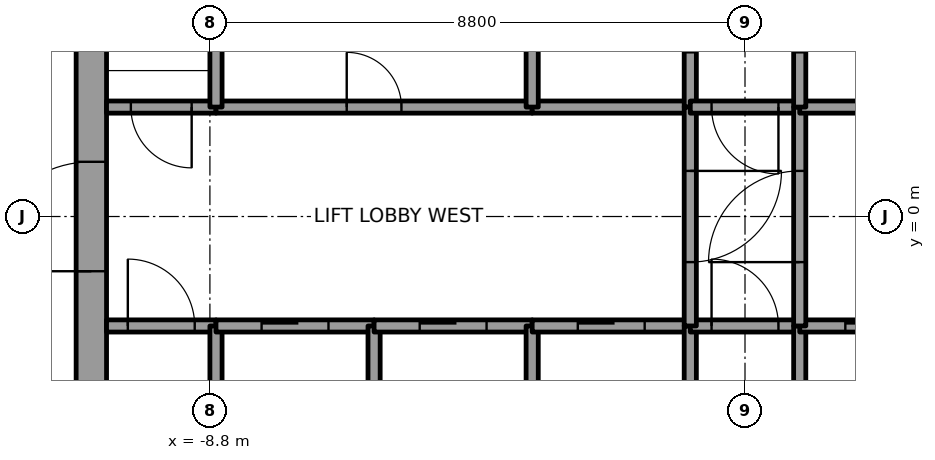
"""IFC4 building model, lengths in metres.
Left out: names, types, materials, properties, quantities, classifications, styles, units other than length and angle.
Written with IfcOpenShell. Run it as: python <this file> out.ifc"""

import sys

from ifc_helpers import new_model, si_unit, direction, frame, frame_2d, origin, place, context, subcontext, project, spatial, rectangle, extrude, element, fill, save


model = new_model("IFC4")
c1 = context("Model", 3, precision=1e-05, world=origin(), true_north=direction((0.0, 1.0)))
c2 = subcontext(c1, "Body", "Model", "MODEL_VIEW")
j1 = project(units=[si_unit("LENGTHUNIT", "METRE"), si_unit("PLANEANGLEUNIT", "RADIAN")], contexts=[c1])
p1 = place(None, origin())
s1 = spatial("IfcSite", under=j1, at=p1, CompositionType="ELEMENT")
p2 = place(p1, origin())
s2 = spatial("IfcBuilding", under=s1, at=p2, CompositionType="ELEMENT")
p3 = place(p2, frame((0.0, 0.0, 255.0)))
s3 = spatial("IfcBuildingStorey", under=s2, at=p3, CompositionType="ELEMENT", Elevation=255.0)
p4 = place(p3, frame((-10.75, -7.5, 0.0), z_axis=(0.0, 0.0, 1.0), x_axis=(0.0, 1.0, 0.0)))
e1 = element("IfcWall", 1, at=p4, inside=s3, PredefinedType="SHEAR", context=c2, shape_type="SweptSolid", body=[
    extrude(rectangle(XDim=15.0, YDim=0.5, at=frame_2d((7.5, 0.0))), origin(), (0.0, 0.0, 1.0), 4.0),
])
p5 = place(p4, frame((6.6, 0.0, 0.0)))
e2 = element("IfcOpeningElement", 2, at=p5, cuts=e1, PredefinedType="OPENING", context=c2, shape_type="SweptSolid", body=[
    extrude(rectangle(XDim=1.8, YDim=2.1, at=frame_2d((0.9, 1.05))), frame((0.0, 0.25, 0.0), z_axis=(0.0, -1.0, 0.0), x_axis=(1.0, 0.0, 0.0)), (0.0, 0.0, 1.0), 0.5),
])
p6 = place(p3, frame((-10.5, -1.8, 0.0), z_axis=(0.0, 0.0, 1.0), x_axis=(1.0, 0.0, 0.0)))
e3 = element("IfcWall", 3, at=p6, inside=s3, PredefinedType="SOLIDWALL", context=c2, shape_type="SweptSolid", body=[
    extrude(rectangle(XDim=1.8, YDim=0.2, at=frame_2d((0.9, 0.0))), origin(), (0.0, 0.0, 1.0), 3.85),
])
p7 = place(p6, frame((0.35, 0.0, 0.0)))
e4 = element("IfcOpeningElement", 4, at=p7, cuts=e3, PredefinedType="OPENING", context=c2, shape_type="SweptSolid", body=[
    extrude(rectangle(XDim=1.1, YDim=2.1, at=frame_2d((0.55, 1.05))), frame((0.0, 0.1, 0.0), z_axis=(0.0, -1.0, 0.0), x_axis=(1.0, 0.0, 0.0)), (0.0, 0.0, 1.0), 0.2),
])
p8 = place(p3, frame((-8.7, 1.8, 0.0), z_axis=(0.0, 0.0, 1.0), x_axis=(-1.0, 0.0, 0.0)))
e5 = element("IfcWall", 5, at=p8, inside=s3, PredefinedType="SOLIDWALL", context=c2, shape_type="SweptSolid", body=[
    extrude(rectangle(XDim=1.8, YDim=0.2, at=frame_2d((0.9, 0.0))), origin(), (0.0, 0.0, 1.0), 3.85),
])
p9 = place(p8, frame((0.4, 0.0, 0.0)))
e6 = element("IfcOpeningElement", 6, at=p9, cuts=e5, PredefinedType="OPENING", context=c2, shape_type="SweptSolid", body=[
    extrude(rectangle(XDim=1.0, YDim=2.1, at=frame_2d((0.5, 1.05))), frame((0.0, 0.1, 0.0), z_axis=(0.0, -1.0, 0.0), x_axis=(1.0, 0.0, 0.0)), (0.0, 0.0, 1.0), 0.2),
])
p10 = place(p3, frame((-8.7, -4.6, 0.0), z_axis=(0.0, 0.0, 1.0), x_axis=(0.0, 1.0, 0.0)))
e7 = element("IfcWall", 7, at=p10, inside=s3, PredefinedType="SOLIDWALL", context=c2, shape_type="SweptSolid", body=[
    extrude(rectangle(XDim=2.8, YDim=0.2, at=frame_2d((1.4, 0.0))), origin(), (0.0, 0.0, 1.0), 3.85),
])
p11 = place(p3, frame((-8.7, -1.8, 0.0), z_axis=(0.0, 0.0, 1.0), x_axis=(1.0, 0.0, 0.0)))
e8 = element("IfcWall", 8, at=p11, inside=s3, PredefinedType="SOLIDWALL", context=c2, shape_type="SweptSolid", body=[
    extrude(rectangle(XDim=2.6, YDim=0.2, at=frame_2d((1.3, 0.0))), origin(), (0.0, 0.0, 1.0), 3.85),
])
p12 = place(p11, frame((0.75, 0.0, 0.0)))
e9 = element("IfcOpeningElement", 9, at=p12, cuts=e8, PredefinedType="OPENING", context=c2, shape_type="SweptSolid", body=[
    extrude(rectangle(XDim=1.1, YDim=2.1, at=frame_2d((0.55, 1.05))), frame((0.0, 0.1, 0.0), z_axis=(0.0, -1.0, 0.0), x_axis=(1.0, 0.0, 0.0)), (0.0, 0.0, 1.0), 0.2),
])
p13 = place(p3, frame((-8.7, 1.8, 0.0), z_axis=(0.0, 0.0, 1.0), x_axis=(1.0, 0.0, 0.0)))
e10 = element("IfcWall", 10, at=p13, inside=s3, PredefinedType="SOLIDWALL", context=c2, shape_type="SweptSolid", body=[
    extrude(rectangle(XDim=5.2, YDim=0.2, at=frame_2d((2.6, 0.0))), origin(), (0.0, 0.0, 1.0), 3.85),
])
p14 = place(p13, frame((2.15, 0.0, 0.0)))
e11 = element("IfcOpeningElement", 11, at=p14, cuts=e10, PredefinedType="OPENING", context=c2, shape_type="SweptSolid", body=[
    extrude(rectangle(XDim=0.9, YDim=2.1, at=frame_2d((0.45, 1.05))), frame((0.0, 0.1, 0.0), z_axis=(0.0, -1.0, 0.0), x_axis=(1.0, 0.0, 0.0)), (0.0, 0.0, 1.0), 0.2),
])
for number, where, z_axis, x_axis in (
    (12, (-8.7, 4.6, 0.0), (0.0, 0.0, 1.0), (0.0, -1.0, 0.0)),
    (13, (-6.1, -4.6, 0.0), (0.0, 0.0, 1.0), (0.0, 1.0, 0.0)),
):
    element("IfcWall", number, at=place(p3, frame(where, z_axis=z_axis, x_axis=x_axis)), inside=s3, PredefinedType="SOLIDWALL", context=c2, shape_type="SweptSolid", body=[
        extrude(rectangle(XDim=2.8, YDim=0.2, at=frame_2d((1.4, 0.0))), origin(), (0.0, 0.0, 1.0), 3.85),
    ])
p15 = place(p3, frame((-6.1, -1.8, 0.0), z_axis=(0.0, 0.0, 1.0), x_axis=(1.0, 0.0, 0.0)))
e14 = element("IfcWall", 14, at=p15, inside=s3, PredefinedType="SOLIDWALL", context=c2, shape_type="SweptSolid", body=[
    extrude(rectangle(XDim=2.6, YDim=0.2, at=frame_2d((1.3, 0.0))), origin(), (0.0, 0.0, 1.0), 3.85),
])
p16 = place(p15, frame((0.75, 0.0, 0.0)))
e15 = element("IfcOpeningElement", 15, at=p16, cuts=e14, PredefinedType="OPENING", context=c2, shape_type="SweptSolid", body=[
    extrude(rectangle(XDim=1.1, YDim=2.1, at=frame_2d((0.55, 1.05))), frame((0.0, 0.1, 0.0), z_axis=(0.0, -1.0, 0.0), x_axis=(1.0, 0.0, 0.0)), (0.0, 0.0, 1.0), 0.2),
])
p17 = place(p3, frame((-3.5, -4.6, 0.0), z_axis=(0.0, 0.0, 1.0), x_axis=(0.0, 1.0, 0.0)))
e16 = element("IfcWall", 16, at=p17, inside=s3, PredefinedType="SOLIDWALL", context=c2, shape_type="SweptSolid", body=[
    extrude(rectangle(XDim=2.8, YDim=0.2, at=frame_2d((1.4, 0.0))), origin(), (0.0, 0.0, 1.0), 3.85),
])
p18 = place(p3, frame((-3.5, -1.8, 0.0), z_axis=(0.0, 0.0, 1.0), x_axis=(1.0, 0.0, 0.0)))
e17 = element("IfcWall", 17, at=p18, inside=s3, PredefinedType="SOLIDWALL", context=c2, shape_type="SweptSolid", body=[
    extrude(rectangle(XDim=2.6, YDim=0.2, at=frame_2d((1.3, 0.0))), origin(), (0.0, 0.0, 1.0), 3.85),
])
p19 = place(p18, frame((0.75, 0.0, 0.0)))
e18 = element("IfcOpeningElement", 18, at=p19, cuts=e17, PredefinedType="OPENING", context=c2, shape_type="SweptSolid", body=[
    extrude(rectangle(XDim=1.1, YDim=2.1, at=frame_2d((0.55, 1.05))), frame((0.0, 0.1, 0.0), z_axis=(0.0, -1.0, 0.0), x_axis=(1.0, 0.0, 0.0)), (0.0, 0.0, 1.0), 0.2),
])
p20 = place(p3, frame((-0.9, 1.8, 0.0), z_axis=(0.0, 0.0, 1.0), x_axis=(-1.0, 0.0, 0.0)))
e19 = element("IfcWall", 19, at=p20, inside=s3, PredefinedType="SOLIDWALL", context=c2, shape_type="SweptSolid", body=[
    extrude(rectangle(XDim=2.6, YDim=0.2, at=frame_2d((1.3, 0.0))), origin(), (0.0, 0.0, 1.0), 3.85),
])
p21 = place(p3, frame((-3.5, 1.8, 0.0), z_axis=(0.0, 0.0, 1.0), x_axis=(0.0, 1.0, 0.0)))
e20 = element("IfcWall", 20, at=p21, inside=s3, PredefinedType="SOLIDWALL", context=c2, shape_type="SweptSolid", body=[
    extrude(rectangle(XDim=2.8, YDim=0.2, at=frame_2d((1.4, 0.0))), origin(), (0.0, 0.0, 1.0), 3.85),
])
p22 = place(p3, frame((-0.9, 1.8, 0.0), z_axis=(0.0, 0.0, 1.0), x_axis=(0.0, 1.0, 0.0)))
e21 = element("IfcWall", 21, at=p22, inside=s3, PredefinedType="SOLIDWALL", context=c2, shape_type="SweptSolid", body=[
    extrude(rectangle(XDim=3.0, YDim=0.2, at=frame_2d((1.5, 0.0))), origin(), (0.0, 0.0, 1.0), 3.85),
])
p23 = place(p22, frame((0.9, 0.0, 0.0)))
e22 = element("IfcOpeningElement", 22, at=p23, cuts=e21, PredefinedType="OPENING", context=c2, shape_type="SweptSolid", body=[
    extrude(rectangle(XDim=1.2, YDim=2.1, at=frame_2d((0.6, 1.05))), frame((0.0, 0.1, 0.0), z_axis=(0.0, -1.0, 0.0), x_axis=(1.0, 0.0, 0.0)), (0.0, 0.0, 1.0), 0.2),
])
p24 = place(p3, frame((-0.9, -4.6, 0.0), z_axis=(0.0, 0.0, 1.0), x_axis=(0.0, 1.0, 0.0)))
e23 = element("IfcWall", 23, at=p24, inside=s3, PredefinedType="SOLIDWALL", context=c2, shape_type="SweptSolid", body=[
    extrude(rectangle(XDim=2.8, YDim=0.2, at=frame_2d((1.4, 0.0))), origin(), (0.0, 0.0, 1.0), 3.85),
])
p25 = place(p3, frame((-0.9, -1.8, 0.0), z_axis=(0.0, 0.0, 1.0), x_axis=(1.0, 0.0, 0.0)))
e24 = element("IfcWall", 24, at=p25, inside=s3, PredefinedType="SOLIDWALL", context=c2, shape_type="SweptSolid", body=[
    extrude(rectangle(XDim=1.8, YDim=0.2, at=frame_2d((0.9, 0.0))), origin(), (0.0, 0.0, 1.0), 3.85),
])
p26 = place(p25, frame((0.35, 0.0, 0.0)))
e25 = element("IfcOpeningElement", 25, at=p26, cuts=e24, PredefinedType="OPENING", context=c2, shape_type="SweptSolid", body=[
    extrude(rectangle(XDim=1.1, YDim=2.1, at=frame_2d((0.55, 1.05))), frame((0.0, 0.1, 0.0), z_axis=(0.0, -1.0, 0.0), x_axis=(1.0, 0.0, 0.0)), (0.0, 0.0, 1.0), 0.2),
])
p27 = place(p3, frame((-0.9, 1.8, 0.0), z_axis=(0.0, 0.0, 1.0), x_axis=(0.0, -1.0, 0.0)))
e26 = element("IfcWall", 26, at=p27, inside=s3, PredefinedType="SOLIDWALL", context=c2, shape_type="SweptSolid", body=[
    extrude(rectangle(XDim=3.6, YDim=0.2, at=frame_2d((1.8, 0.0))), origin(), (0.0, 0.0, 1.0), 3.85),
])
p28 = place(p27, frame((1.05, 0.0, 0.0)))
e27 = element("IfcOpeningElement", 27, at=p28, cuts=e26, PredefinedType="OPENING", context=c2, shape_type="SweptSolid", body=[
    extrude(rectangle(XDim=1.5, YDim=2.1, at=frame_2d((0.75, 1.05))), frame((0.0, 0.1, 0.0), z_axis=(0.0, -1.0, 0.0), x_axis=(1.0, 0.0, 0.0)), (0.0, 0.0, 1.0), 0.2),
])
p29 = place(p3, frame((0.9, 1.8, 0.0), z_axis=(0.0, 0.0, 1.0), x_axis=(-1.0, 0.0, 0.0)))
e28 = element("IfcWall", 28, at=p29, inside=s3, PredefinedType="SOLIDWALL", context=c2, shape_type="SweptSolid", body=[
    extrude(rectangle(XDim=1.8, YDim=0.2, at=frame_2d((0.9, 0.0))), origin(), (0.0, 0.0, 1.0), 3.85),
])
p30 = place(p29, frame((0.35, 0.0, 0.0)))
e29 = element("IfcOpeningElement", 29, at=p30, cuts=e28, PredefinedType="OPENING", context=c2, shape_type="SweptSolid", body=[
    extrude(rectangle(XDim=1.1, YDim=2.1, at=frame_2d((0.55, 1.05))), frame((0.0, 0.1, 0.0), z_axis=(0.0, -1.0, 0.0), x_axis=(1.0, 0.0, 0.0)), (0.0, 0.0, 1.0), 0.2),
])
p31 = place(p3, frame((0.9, -1.8, 0.0), z_axis=(0.0, 0.0, 1.0), x_axis=(0.0, -1.0, 0.0)))
e30 = element("IfcWall", 30, at=p31, inside=s3, PredefinedType="SOLIDWALL", context=c2, shape_type="SweptSolid", body=[
    extrude(rectangle(XDim=2.8, YDim=0.2, at=frame_2d((1.4, 0.0))), origin(), (0.0, 0.0, 1.0), 3.85),
])
p32 = place(p3, frame((0.9, -1.8, 0.0), z_axis=(0.0, 0.0, 1.0), x_axis=(1.0, 0.0, 0.0)))
e31 = element("IfcWall", 31, at=p32, inside=s3, PredefinedType="SOLIDWALL", context=c2, shape_type="SweptSolid", body=[
    extrude(rectangle(XDim=2.6, YDim=0.2, at=frame_2d((1.3, 0.0))), origin(), (0.0, 0.0, 1.0), 3.85),
])
p33 = place(p32, frame((0.75, 0.0, 0.0)))
e32 = element("IfcOpeningElement", 32, at=p33, cuts=e31, PredefinedType="OPENING", context=c2, shape_type="SweptSolid", body=[
    extrude(rectangle(XDim=1.1, YDim=2.1, at=frame_2d((0.55, 1.05))), frame((0.0, 0.1, 0.0), z_axis=(0.0, -1.0, 0.0), x_axis=(1.0, 0.0, 0.0)), (0.0, 0.0, 1.0), 0.2),
])
p34 = place(p3, frame((0.9, -1.8, 0.0), z_axis=(0.0, 0.0, 1.0), x_axis=(0.0, 1.0, 0.0)))
e33 = element("IfcWall", 33, at=p34, inside=s3, PredefinedType="SOLIDWALL", context=c2, shape_type="SweptSolid", body=[
    extrude(rectangle(XDim=3.6, YDim=0.2, at=frame_2d((1.8, 0.0))), origin(), (0.0, 0.0, 1.0), 3.85),
])
p35 = place(p34, frame((1.05, 0.0, 0.0)))
e34 = element("IfcOpeningElement", 34, at=p35, cuts=e33, PredefinedType="OPENING", context=c2, shape_type="SweptSolid", body=[
    extrude(rectangle(XDim=1.5, YDim=2.1, at=frame_2d((0.75, 1.05))), frame((0.0, 0.1, 0.0), z_axis=(0.0, -1.0, 0.0), x_axis=(1.0, 0.0, 0.0)), (0.0, 0.0, 1.0), 0.2),
])
p36 = place(p3, frame((3.5, 1.8, 0.0), z_axis=(0.0, 0.0, 1.0), x_axis=(-1.0, 0.0, 0.0)))
e35 = element("IfcWall", 35, at=p36, inside=s3, PredefinedType="SOLIDWALL", context=c2, shape_type="SweptSolid", body=[
    extrude(rectangle(XDim=2.6, YDim=0.2, at=frame_2d((1.3, 0.0))), origin(), (0.0, 0.0, 1.0), 3.85),
])
p37 = place(p3, frame((0.9, 4.8, 0.0), z_axis=(0.0, 0.0, 1.0), x_axis=(0.0, -1.0, 0.0)))
e36 = element("IfcWall", 36, at=p37, inside=s3, PredefinedType="SOLIDWALL", context=c2, shape_type="SweptSolid", body=[
    extrude(rectangle(XDim=3.0, YDim=0.2, at=frame_2d((1.5, 0.0))), origin(), (0.0, 0.0, 1.0), 3.85),
])
p38 = place(p37, frame((0.9, 0.0, 0.0)))
e37 = element("IfcOpeningElement", 37, at=p38, cuts=e36, PredefinedType="OPENING", context=c2, shape_type="SweptSolid", body=[
    extrude(rectangle(XDim=1.2, YDim=2.1, at=frame_2d((0.6, 1.05))), frame((0.0, 0.1, 0.0), z_axis=(0.0, -1.0, 0.0), x_axis=(1.0, 0.0, 0.0)), (0.0, 0.0, 1.0), 0.2),
])
p39 = place(p12, origin())
e38 = element("IfcDoor", 38, at=p39, inside=s3, OperationType="SLIDING_TO_RIGHT", PredefinedType="DOOR", context=c2, shape_type="SweptSolid", body=[
    extrude(rectangle(XDim=1.1, YDim=2.1, at=frame_2d((0.55, 1.05))), frame((0.0, 0.025, 0.0), z_axis=(0.0, -1.0, 0.0), x_axis=(1.0, 0.0, 0.0)), (0.0, 0.0, 1.0), 0.05),
])
fill(e9, e38)
p40 = place(p16, origin())
e39 = element("IfcDoor", 39, at=p40, inside=s3, OperationType="SLIDING_TO_LEFT", PredefinedType="DOOR", context=c2, shape_type="SweptSolid", body=[
    extrude(rectangle(XDim=1.1, YDim=2.1, at=frame_2d((0.55, 1.05))), frame((0.0, 0.025, 0.0), z_axis=(0.0, -1.0, 0.0), x_axis=(1.0, 0.0, 0.0)), (0.0, 0.0, 1.0), 0.05),
])
fill(e15, e39)
p41 = place(p19, origin())
e40 = element("IfcDoor", 40, at=p41, inside=s3, OperationType="SLIDING_TO_RIGHT", PredefinedType="DOOR", context=c2, shape_type="SweptSolid", body=[
    extrude(rectangle(XDim=1.1, YDim=2.1, at=frame_2d((0.55, 1.05))), frame((0.0, 0.025, 0.0), z_axis=(0.0, -1.0, 0.0), x_axis=(1.0, 0.0, 0.0)), (0.0, 0.0, 1.0), 0.05),
])
fill(e18, e40)
p42 = place(p33, origin())
e41 = element("IfcDoor", 41, at=p42, inside=s3, OperationType="SLIDING_TO_RIGHT", PredefinedType="DOOR", context=c2, shape_type="SweptSolid", body=[
    extrude(rectangle(XDim=1.1, YDim=2.1, at=frame_2d((0.55, 1.05))), frame((0.0, 0.025, 0.0), z_axis=(0.0, -1.0, 0.0), x_axis=(1.0, 0.0, 0.0)), (0.0, 0.0, 1.0), 0.05),
])
fill(e32, e41)
p43 = place(p28, origin())
e42 = element("IfcDoor", 42, at=p43, inside=s3, OperationType="DOUBLE_DOOR_SINGLE_SWING", PredefinedType="DOOR", context=c2, shape_type="SweptSolid", body=[
    extrude(rectangle(XDim=1.5, YDim=2.1, at=frame_2d((0.75, 1.05))), frame((0.0, 0.025, 0.0), z_axis=(0.0, -1.0, 0.0), x_axis=(1.0, 0.0, 0.0)), (0.0, 0.0, 1.0), 0.05),
])
fill(e27, e42)
p44 = place(p35, origin())
e43 = element("IfcDoor", 43, at=p44, inside=s3, OperationType="DOUBLE_DOOR_SINGLE_SWING", PredefinedType="DOOR", context=c2, shape_type="SweptSolid", body=[
    extrude(rectangle(XDim=1.5, YDim=2.1, at=frame_2d((0.75, 1.05))), frame((0.0, 0.025, 0.0), z_axis=(0.0, -1.0, 0.0), x_axis=(1.0, 0.0, 0.0)), (0.0, 0.0, 1.0), 0.05),
])
fill(e34, e43)
p45 = place(p7, origin())
e44 = element("IfcDoor", 44, at=p45, inside=s3, OperationType="SINGLE_SWING_LEFT", PredefinedType="DOOR", context=c2, shape_type="SweptSolid", body=[
    extrude(rectangle(XDim=1.1, YDim=2.1, at=frame_2d((0.55, 1.05))), frame((0.0, 0.025, 0.0), z_axis=(0.0, -1.0, 0.0), x_axis=(1.0, 0.0, 0.0)), (0.0, 0.0, 1.0), 0.05),
])
fill(e4, e44)
p46 = place(p30, origin())
e45 = element("IfcDoor", 45, at=p46, inside=s3, OperationType="SINGLE_SWING_LEFT", PredefinedType="DOOR", context=c2, shape_type="SweptSolid", body=[
    extrude(rectangle(XDim=1.1, YDim=2.1, at=frame_2d((0.55, 1.05))), frame((0.0, 0.025, 0.0), z_axis=(0.0, -1.0, 0.0), x_axis=(1.0, 0.0, 0.0)), (0.0, 0.0, 1.0), 0.05),
])
fill(e29, e45)
p47 = place(p26, origin())
e46 = element("IfcDoor", 46, at=p47, inside=s3, OperationType="SINGLE_SWING_LEFT", PredefinedType="DOOR", context=c2, shape_type="SweptSolid", body=[
    extrude(rectangle(XDim=1.1, YDim=2.1, at=frame_2d((0.55, 1.05))), frame((0.0, 0.025, 0.0), z_axis=(0.0, -1.0, 0.0), x_axis=(1.0, 0.0, 0.0)), (0.0, 0.0, 1.0), 0.05),
])
fill(e25, e46)
p48 = place(p9, origin())
e47 = element("IfcDoor", 47, at=p48, inside=s3, OperationType="SINGLE_SWING_RIGHT", PredefinedType="DOOR", context=c2, shape_type="SweptSolid", body=[
    extrude(rectangle(XDim=1.0, YDim=2.1, at=frame_2d((0.5, 1.05))), frame((0.0, 0.025, 0.0), z_axis=(0.0, -1.0, 0.0), x_axis=(1.0, 0.0, 0.0)), (0.0, 0.0, 1.0), 0.05),
])
fill(e6, e47)
p49 = place(p14, origin())
e48 = element("IfcDoor", 48, at=p49, inside=s3, OperationType="SINGLE_SWING_LEFT", PredefinedType="DOOR", context=c2, shape_type="SweptSolid", body=[
    extrude(rectangle(XDim=0.9, YDim=2.1, at=frame_2d((0.45, 1.05))), frame((0.0, 0.025, 0.0), z_axis=(0.0, -1.0, 0.0), x_axis=(1.0, 0.0, 0.0)), (0.0, 0.0, 1.0), 0.05),
])
fill(e11, e48)
p50 = place(p5, origin())
e49 = element("IfcDoor", 49, at=p50, inside=s3, OperationType="DOUBLE_DOOR_SINGLE_SWING", PredefinedType="DOOR", context=c2, shape_type="SweptSolid", body=[
    extrude(rectangle(XDim=1.8, YDim=2.1, at=frame_2d((0.9, 1.05))), frame((0.0, 0.025, 0.0), z_axis=(0.0, -1.0, 0.0), x_axis=(1.0, 0.0, 0.0)), (0.0, 0.0, 1.0), 0.05),
])
fill(e2, e49)
save(model, sys.argv[1])
